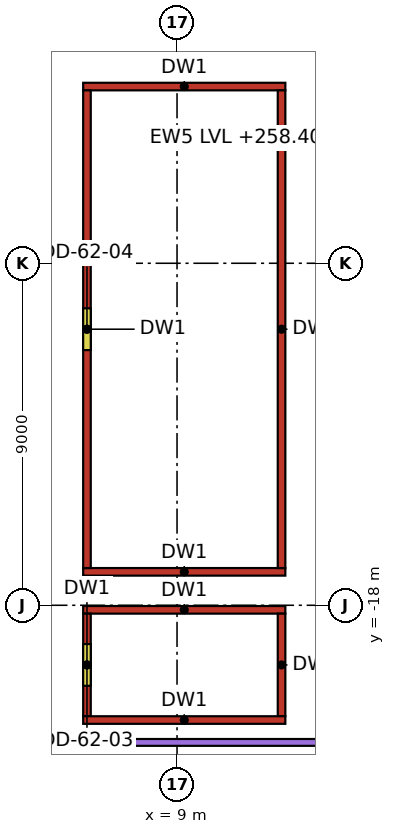
"""IFC4 building model, lengths in metres.
Left out: names, types, materials, properties, quantities, classifications, styles, units other than length and angle.
Written with IfcOpenShell. Run it as: python <this file> out.ifc"""

import sys

from ifc_helpers import new_model, si_unit, direction, frame, frame_2d, origin, place, context, subcontext, project, spatial, rectangle, extrude, element, fill, save


model = new_model("IFC4")
c1 = context("Model", 3, precision=1e-05, world=origin(), true_north=direction((0.0, 1.0)))
c2 = subcontext(c1, "Body", "Model", "MODEL_VIEW")
j1 = project(units=[si_unit("LENGTHUNIT", "METRE"), si_unit("PLANEANGLEUNIT", "RADIAN")], contexts=[c1])
p1 = place(None, origin())
s1 = spatial("IfcSite", under=j1, at=p1, CompositionType="ELEMENT")
p2 = place(p1, origin())
s2 = spatial("IfcBuilding", under=s1, at=p2, CompositionType="ELEMENT")
p3 = place(p2, frame((0.0, 0.0, 258.4)))
s3 = spatial("IfcBuildingStorey", under=s2, at=p3, CompositionType="ELEMENT", Elevation=258.4)
for number, where, z_axis, x_axis in (
    (1, (6.53, -21.02, 0.0), (0.0, 0.0, 1.0), (1.0, 0.0, 0.0)),
    (2, (6.53, -18.12, 0.0), (0.0, 0.0, 1.0), (1.0, 0.0, 0.0)),
):
    element("IfcWall", number, at=place(p3, frame(where, z_axis=z_axis, x_axis=x_axis)), inside=s3, PredefinedType="PARTITIONING", context=c2, shape_type="SweptSolid", body=[
        extrude(rectangle(XDim=5.32, YDim=0.2, at=frame_2d((2.66, 0.0))), origin(), (0.0, 0.0, 1.0), 3.3),
    ])
p4 = place(p3, frame((6.63, -20.92, 0.0), z_axis=(0.0, 0.0, 1.0), x_axis=(0.0, 1.0, 0.0)))
e3 = element("IfcWall", 3, at=p4, inside=s3, PredefinedType="PARTITIONING", context=c2, shape_type="SweptSolid", body=[
    extrude(rectangle(XDim=2.7, YDim=0.2, at=frame_2d((1.35, 0.0))), origin(), (0.0, 0.0, 1.0), 3.3),
])
p5 = place(p4, frame((0.8, 0.0, 0.0)))
e4 = element("IfcOpeningElement", 4, at=p5, cuts=e3, PredefinedType="OPENING", context=c2, shape_type="SweptSolid", body=[
    extrude(rectangle(XDim=1.1, YDim=2.1, at=frame_2d((0.55, 1.05))), frame((0.0, 0.1, 0.0), z_axis=(0.0, -1.0, 0.0), x_axis=(1.0, 0.0, 0.0)), (0.0, 0.0, 1.0), 0.2),
])
p6 = place(p3, frame((11.75, -20.92, 0.0), z_axis=(0.0, 0.0, 1.0), x_axis=(0.0, 1.0, 0.0)))
e5 = element("IfcWall", 5, at=p6, inside=s3, PredefinedType="PARTITIONING", context=c2, shape_type="SweptSolid", body=[
    extrude(rectangle(XDim=2.7, YDim=0.2, at=frame_2d((1.35, 0.0))), origin(), (0.0, 0.0, 1.0), 3.3),
])
for number, where, z_axis, x_axis in (
    (6, (6.53, -17.12, 0.0), (0.0, 0.0, 1.0), (1.0, 0.0, 0.0)),
    (7, (6.53, -4.35, 0.0), (0.0, 0.0, 1.0), (1.0, 0.0, 0.0)),
):
    element("IfcWall", number, at=place(p3, frame(where, z_axis=z_axis, x_axis=x_axis)), inside=s3, PredefinedType="PARTITIONING", context=c2, shape_type="SweptSolid", body=[
        extrude(rectangle(XDim=5.32, YDim=0.2, at=frame_2d((2.66, 0.0))), origin(), (0.0, 0.0, 1.0), 3.3),
    ])
p7 = place(p3, frame((6.63, -17.02, 0.0), z_axis=(0.0, 0.0, 1.0), x_axis=(0.0, 1.0, 0.0)))
e8 = element("IfcWall", 8, at=p7, inside=s3, PredefinedType="PARTITIONING", context=c2, shape_type="SweptSolid", body=[
    extrude(rectangle(XDim=12.57, YDim=0.2, at=frame_2d((6.285, 0.0))), origin(), (0.0, 0.0, 1.0), 3.3),
])
p8 = place(p7, frame((5.735, 0.0, 0.0)))
e9 = element("IfcOpeningElement", 9, at=p8, cuts=e8, PredefinedType="OPENING", context=c2, shape_type="SweptSolid", body=[
    extrude(rectangle(XDim=1.1, YDim=2.1, at=frame_2d((0.55, 1.05))), frame((0.0, 0.1, 0.0), z_axis=(0.0, -1.0, 0.0), x_axis=(1.0, 0.0, 0.0)), (0.0, 0.0, 1.0), 0.2),
])
p9 = place(p3, frame((11.75, -17.02, 0.0), z_axis=(0.0, 0.0, 1.0), x_axis=(0.0, 1.0, 0.0)))
e10 = element("IfcWall", 10, at=p9, inside=s3, PredefinedType="PARTITIONING", context=c2, shape_type="SweptSolid", body=[
    extrude(rectangle(XDim=12.57, YDim=0.2, at=frame_2d((6.285, 0.0))), origin(), (0.0, 0.0, 1.0), 3.3),
])
p10 = place(p5, frame((1.1, 0.0, 0.0), z_axis=(0.0, 0.0, 1.0), x_axis=(-1.0, 0.0, 0.0)))
e11 = element("IfcDoor", 11, at=p10, inside=s3, OperationType="SINGLE_SWING_LEFT", PredefinedType="DOOR", context=c2, shape_type="SweptSolid", body=[
    extrude(rectangle(XDim=1.1, YDim=2.1, at=frame_2d((0.55, 1.05))), frame((0.0, 0.025, 0.0), z_axis=(0.0, -1.0, 0.0), x_axis=(1.0, 0.0, 0.0)), (0.0, 0.0, 1.0), 0.05),
])
fill(e4, e11)
p11 = place(p8, frame((1.1, 0.0, 0.0), z_axis=(0.0, 0.0, 1.0), x_axis=(-1.0, 0.0, 0.0)))
e12 = element("IfcDoor", 12, at=p11, inside=s3, OperationType="SINGLE_SWING_LEFT", PredefinedType="DOOR", context=c2, shape_type="SweptSolid", body=[
    extrude(rectangle(XDim=1.1, YDim=2.1, at=frame_2d((0.55, 1.05))), frame((0.0, 0.025, 0.0), z_axis=(0.0, -1.0, 0.0), x_axis=(1.0, 0.0, 0.0)), (0.0, 0.0, 1.0), 0.05),
])
fill(e9, e12)
save(model, sys.argv[1])
